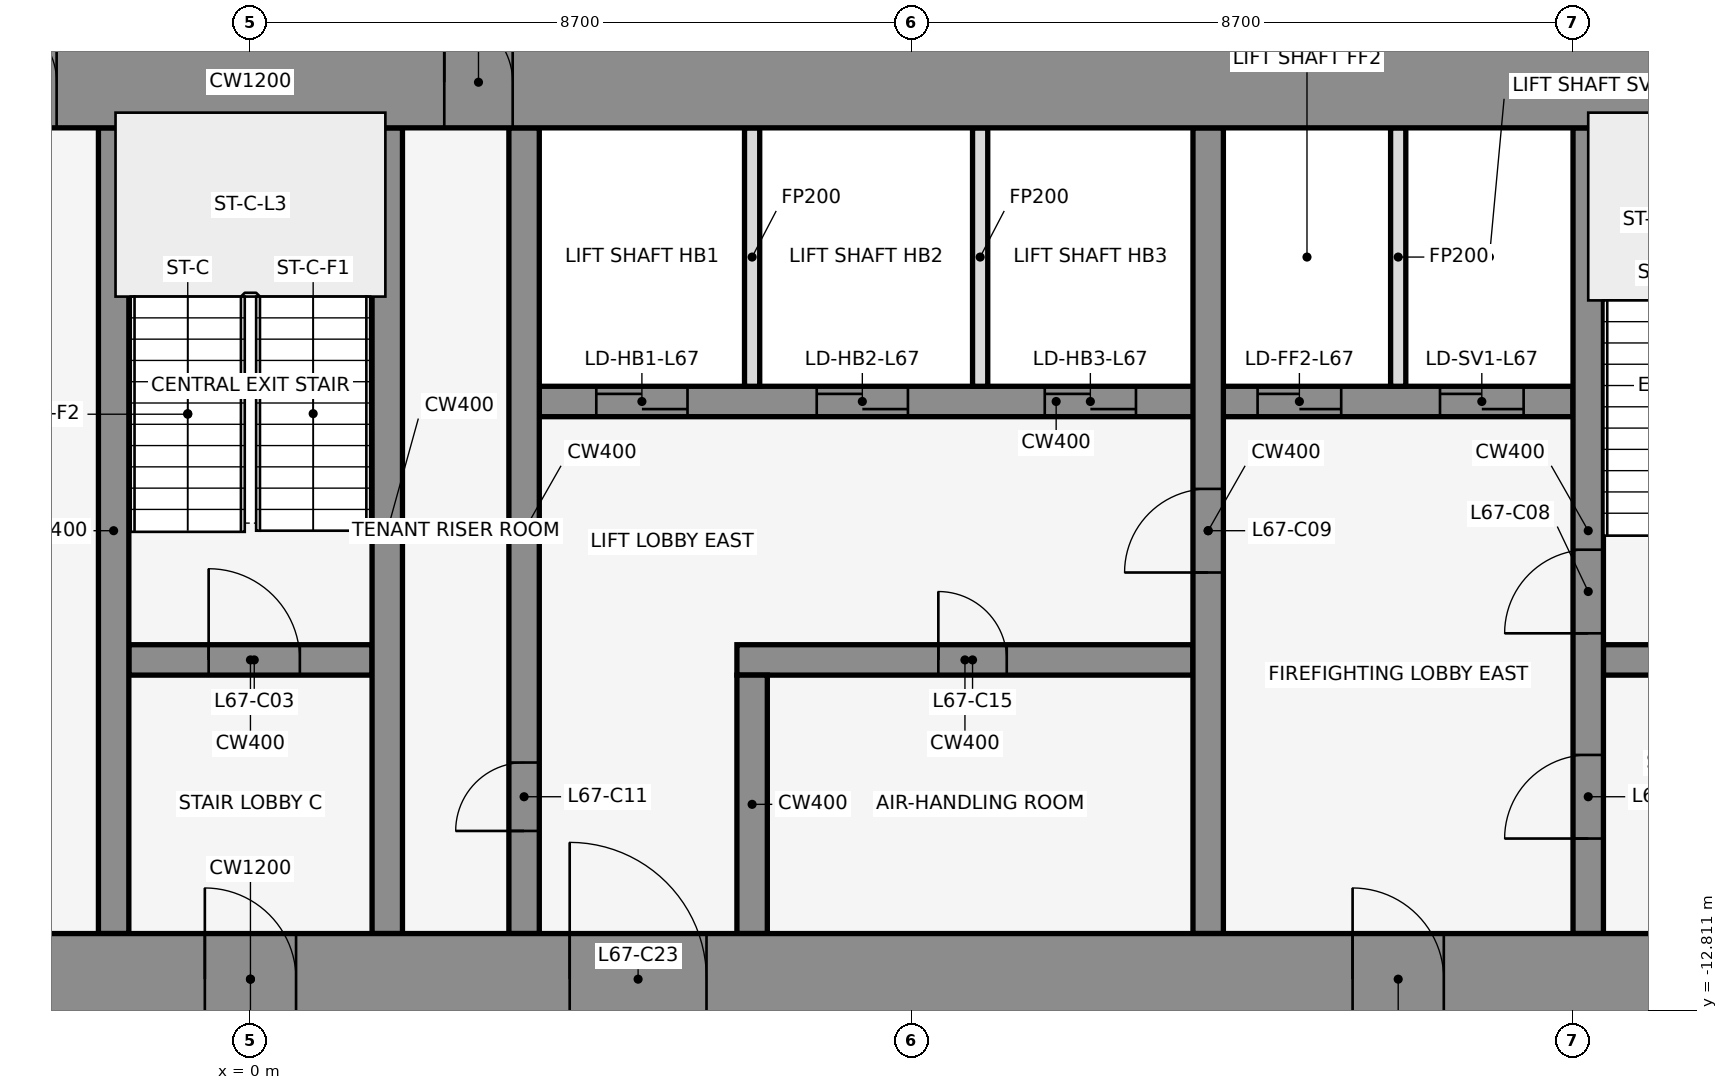
"""IFC4 building model, lengths in metres.
Left out: names, types, materials, properties, quantities, classifications, styles, units other than length and angle.
Written with IfcOpenShell. Run it as: python <this file> out.ifc"""

import sys

from ifc_helpers import new_model, si_unit, direction, frame, frame_2d, origin, place, context, subcontext, project, spatial, rectangle, extrude, element, fill, save


model = new_model("IFC4")
c1 = context("Model", 3, precision=1e-05, world=origin(), true_north=direction((0.0, 1.0)))
c2 = subcontext(c1, "Body", "Model", "MODEL_VIEW")
j1 = project(units=[si_unit("LENGTHUNIT", "METRE"), si_unit("PLANEANGLEUNIT", "RADIAN")], contexts=[c1])
p1 = place(None, origin())
s1 = spatial("IfcSite", under=j1, at=p1, CompositionType="ELEMENT")
p2 = place(p1, origin())
s2 = spatial("IfcBuilding", under=s1, at=p2, CompositionType="ELEMENT")
p3 = place(p2, frame((0.0, 0.0, 297.5)))
s3 = spatial("IfcBuildingStorey", under=s2, at=p3, CompositionType="ELEMENT", Elevation=297.5)
for number, where, z_axis, x_axis in (
    (1, (16.432, -0.105, 0.0), (0.0, 0.0, 1.0), (-0.84, 0.543, 0.0)),
    (2, (1.901, 1.08, 0.0), (0.0, 0.0, 1.0), (-0.84, -0.543, 0.0)),
    (3, (-0.068, -0.105, 0.0), (0.0, 0.0, 1.0), (-0.84, 0.543, 0.0)),
):
    element("IfcWall", number, at=place(p3, frame(where, z_axis=z_axis, x_axis=x_axis)), inside=s3, PredefinedType="STANDARD", context=c2, shape_type="SweptSolid", body=[
        extrude(rectangle(XDim=2.183, YDim=0.25, at=frame_2d((1.091, 0.0))), origin(), (0.0, 0.0, 1.0), 4.35),
    ])
p4 = place(p3, frame((-1.6, -8.2, 0.0), z_axis=(0.0, 0.0, 1.0), x_axis=(1.0, 0.0, 0.0)))
e4 = element("IfcWall", 4, at=p4, inside=s3, PredefinedType="SHEAR", context=c2, shape_type="SweptSolid", body=[
    extrude(rectangle(XDim=3.2, YDim=0.4, at=frame_2d((1.6, 0.0))), origin(), (0.0, 0.0, 1.0), 4.5),
])
p5 = place(p4, frame((1.05, 0.0, 0.0)))
e5 = element("IfcOpeningElement", 5, at=p5, cuts=e4, PredefinedType="OPENING", context=c2, shape_type="SweptSolid", body=[
    extrude(rectangle(XDim=1.2, YDim=2.1, at=frame_2d((0.6, 1.05))), frame((0.0, 0.212, 0.0), z_axis=(0.0, -1.0, 0.0), x_axis=(1.0, 0.0, 0.0)), (0.0, 0.0, 1.0), 0.424),
])
p6 = place(p3, frame((6.4, -8.2, 0.0), z_axis=(0.0, 0.0, 1.0), x_axis=(1.0, 0.0, 0.0)))
e6 = element("IfcWall", 6, at=p6, inside=s3, PredefinedType="SHEAR", context=c2, shape_type="SweptSolid", body=[
    extrude(rectangle(XDim=6.0, YDim=0.4, at=frame_2d((3.0, 0.0))), origin(), (0.0, 0.0, 1.0), 4.5),
])
p7 = place(p6, frame((2.65, 0.0, 0.0)))
e7 = element("IfcOpeningElement", 7, at=p7, cuts=e6, PredefinedType="OPENING", context=c2, shape_type="SweptSolid", body=[
    extrude(rectangle(XDim=0.9, YDim=2.1, at=frame_2d((0.45, 1.05))), frame((0.0, 0.212, 0.0), z_axis=(0.0, -1.0, 0.0), x_axis=(1.0, 0.0, 0.0)), (0.0, 0.0, 1.0), 0.424),
])
p8 = place(p3, frame((17.8, -8.2, 0.0), z_axis=(0.0, 0.0, 1.0), x_axis=(1.0, 0.0, 0.0)))
e8 = element("IfcWall", 8, at=p8, inside=s3, PredefinedType="SHEAR", context=c2, shape_type="SweptSolid", body=[
    extrude(rectangle(XDim=3.0, YDim=0.4, at=frame_2d((1.5, 0.0))), origin(), (0.0, 0.0, 1.0), 4.5),
])
p9 = place(p8, frame((0.85, 0.0, 0.0)))
e9 = element("IfcOpeningElement", 9, at=p9, cuts=e8, PredefinedType="OPENING", context=c2, shape_type="SweptSolid", body=[
    extrude(rectangle(XDim=1.2, YDim=2.1, at=frame_2d((0.6, 1.05))), frame((0.0, 0.212, 0.0), z_axis=(0.0, -1.0, 0.0), x_axis=(1.0, 0.0, 0.0)), (0.0, 0.0, 1.0), 0.424),
])
p10 = place(p3, frame((3.8, -4.8, 0.0), z_axis=(0.0, 0.0, 1.0), x_axis=(1.0, 0.0, 0.0)))
e10 = element("IfcWall", 10, at=p10, inside=s3, PredefinedType="SHEAR", context=c2, shape_type="SweptSolid", body=[
    extrude(rectangle(XDim=13.6, YDim=0.4, at=frame_2d((6.8, 0.0))), origin(), (0.0, 0.0, 1.0), 4.5),
])
p11 = place(p10, frame((0.75, 0.0, 0.0)))
e11 = element("IfcOpeningElement", 11, at=p11, cuts=e10, PredefinedType="OPENING", context=c2, shape_type="SweptSolid", body=[
    extrude(rectangle(XDim=1.2, YDim=2.1, at=frame_2d((0.6, 1.05))), frame((0.0, 0.212, 0.0), z_axis=(0.0, -1.0, 0.0), x_axis=(1.0, 0.0, 0.0)), (0.0, 0.0, 1.0), 0.424),
])
p12 = place(p10, frame((3.65, 0.0, 0.0)))
e12 = element("IfcOpeningElement", 12, at=p12, cuts=e10, PredefinedType="OPENING", context=c2, shape_type="SweptSolid", body=[
    extrude(rectangle(XDim=1.2, YDim=2.1, at=frame_2d((0.6, 1.05))), frame((0.0, 0.212, 0.0), z_axis=(0.0, -1.0, 0.0), x_axis=(1.0, 0.0, 0.0)), (0.0, 0.0, 1.0), 0.424),
])
p13 = place(p10, frame((6.65, 0.0, 0.0)))
e13 = element("IfcOpeningElement", 13, at=p13, cuts=e10, PredefinedType="OPENING", context=c2, shape_type="SweptSolid", body=[
    extrude(rectangle(XDim=1.2, YDim=2.1, at=frame_2d((0.6, 1.05))), frame((0.0, 0.212, 0.0), z_axis=(0.0, -1.0, 0.0), x_axis=(1.0, 0.0, 0.0)), (0.0, 0.0, 1.0), 0.424),
])
p14 = place(p10, frame((9.45, 0.0, 0.0)))
e14 = element("IfcOpeningElement", 14, at=p14, cuts=e10, PredefinedType="OPENING", context=c2, shape_type="SweptSolid", body=[
    extrude(rectangle(XDim=1.1, YDim=2.1, at=frame_2d((0.55, 1.05))), frame((0.0, 0.212, 0.0), z_axis=(0.0, -1.0, 0.0), x_axis=(1.0, 0.0, 0.0)), (0.0, 0.0, 1.0), 0.424),
])
p15 = place(p10, frame((11.85, 0.0, 0.0)))
e15 = element("IfcOpeningElement", 15, at=p15, cuts=e10, PredefinedType="OPENING", context=c2, shape_type="SweptSolid", body=[
    extrude(rectangle(XDim=1.1, YDim=2.1, at=frame_2d((0.55, 1.05))), frame((0.0, 0.212, 0.0), z_axis=(0.0, -1.0, 0.0), x_axis=(1.0, 0.0, 0.0)), (0.0, 0.0, 1.0), 0.424),
])
for number, where, z_axis, x_axis in (
    (16, (-1.8, -11.8, 0.0), (0.0, 0.0, 1.0), (0.0, 1.0, 0.0)),
    (17, (1.8, -11.8, 0.0), (0.0, 0.0, 1.0), (0.0, 1.0, 0.0)),
):
    element("IfcWall", number, at=place(p3, frame(where, z_axis=z_axis, x_axis=x_axis)), inside=s3, PredefinedType="SHEAR", context=c2, shape_type="SweptSolid", body=[
        extrude(rectangle(XDim=10.6, YDim=0.4, at=frame_2d((5.3, 0.0))), origin(), (0.0, 0.0, 1.0), 4.5),
    ])
p16 = place(p3, frame((3.6, -11.8, 0.0), z_axis=(0.0, 0.0, 1.0), x_axis=(0.0, 1.0, 0.0)))
e18 = element("IfcWall", 18, at=p16, inside=s3, PredefinedType="SHEAR", context=c2, shape_type="SweptSolid", body=[
    extrude(rectangle(XDim=10.6, YDim=0.4, at=frame_2d((5.3, 0.0))), origin(), (0.0, 0.0, 1.0), 4.5),
])
p17 = place(p16, frame((1.35, 0.0, 0.0)))
e19 = element("IfcOpeningElement", 19, at=p17, cuts=e18, PredefinedType="OPENING", context=c2, shape_type="SweptSolid", body=[
    extrude(rectangle(XDim=0.9, YDim=2.1, at=frame_2d((0.45, 1.05))), frame((0.0, 0.212, 0.0), z_axis=(0.0, -1.0, 0.0), x_axis=(1.0, 0.0, 0.0)), (0.0, 0.0, 1.0), 0.424),
])
p18 = place(p3, frame((6.6, -11.8, 0.0), z_axis=(0.0, 0.0, 1.0), x_axis=(0.0, 1.0, 0.0)))
e20 = element("IfcWall", 20, at=p18, inside=s3, PredefinedType="SHEAR", context=c2, shape_type="SweptSolid", body=[
    extrude(rectangle(XDim=3.4, YDim=0.4, at=frame_2d((1.7, 0.0))), origin(), (0.0, 0.0, 1.0), 4.5),
])
for number, where, z_axis, x_axis in (
    (21, (6.6, -4.6, 0.0), (0.0, 0.0, 1.0), (0.0, 1.0, 0.0)),
    (22, (9.6, -4.6, 0.0), (0.0, 0.0, 1.0), (0.0, 1.0, 0.0)),
):
    element("IfcWall", number, at=place(p3, frame(where, z_axis=z_axis, x_axis=x_axis)), inside=s3, PredefinedType="PARTITIONING", context=c2, shape_type="SweptSolid", body=[
        extrude(rectangle(XDim=3.4, YDim=0.2, at=frame_2d((1.7, 0.0))), origin(), (0.0, 0.0, 1.0), 3.418),
    ])
p19 = place(p3, frame((12.6, -11.8, 0.0), z_axis=(0.0, 0.0, 1.0), x_axis=(0.0, 1.0, 0.0)))
e23 = element("IfcWall", 23, at=p19, inside=s3, PredefinedType="SHEAR", context=c2, shape_type="SweptSolid", body=[
    extrude(rectangle(XDim=10.6, YDim=0.4, at=frame_2d((5.3, 0.0))), origin(), (0.0, 0.0, 1.0), 4.5),
])
p20 = place(p19, frame((4.75, 0.0, 0.0)))
e24 = element("IfcOpeningElement", 24, at=p20, cuts=e23, PredefinedType="OPENING", context=c2, shape_type="SweptSolid", body=[
    extrude(rectangle(XDim=1.1, YDim=2.1, at=frame_2d((0.55, 1.05))), frame((0.0, 0.212, 0.0), z_axis=(0.0, -1.0, 0.0), x_axis=(1.0, 0.0, 0.0)), (0.0, 0.0, 1.0), 0.424),
])
p21 = place(p3, frame((15.1, -4.6, 0.0), z_axis=(0.0, 0.0, 1.0), x_axis=(0.0, 1.0, 0.0)))
e25 = element("IfcWall", 25, at=p21, inside=s3, PredefinedType="PARTITIONING", context=c2, shape_type="SweptSolid", body=[
    extrude(rectangle(XDim=3.4, YDim=0.2, at=frame_2d((1.7, 0.0))), origin(), (0.0, 0.0, 1.0), 3.418),
])
p22 = place(p3, frame((17.6, -11.8, 0.0), z_axis=(0.0, 0.0, 1.0), x_axis=(0.0, 1.0, 0.0)))
e26 = element("IfcWall", 26, at=p22, inside=s3, PredefinedType="SHEAR", context=c2, shape_type="SweptSolid", body=[
    extrude(rectangle(XDim=10.6, YDim=0.4, at=frame_2d((5.3, 0.0))), origin(), (0.0, 0.0, 1.0), 4.5),
])
p23 = place(p22, frame((1.25, 0.0, 0.0)))
e27 = element("IfcOpeningElement", 27, at=p23, cuts=e26, PredefinedType="OPENING", context=c2, shape_type="SweptSolid", body=[
    extrude(rectangle(XDim=1.1, YDim=2.1, at=frame_2d((0.55, 1.05))), frame((0.0, 0.212, 0.0), z_axis=(0.0, -1.0, 0.0), x_axis=(1.0, 0.0, 0.0)), (0.0, 0.0, 1.0), 0.424),
])
p24 = place(p22, frame((3.95, 0.0, 0.0)))
e28 = element("IfcOpeningElement", 28, at=p24, cuts=e26, PredefinedType="OPENING", context=c2, shape_type="SweptSolid", body=[
    extrude(rectangle(XDim=1.1, YDim=2.1, at=frame_2d((0.55, 1.05))), frame((0.0, 0.212, 0.0), z_axis=(0.0, -1.0, 0.0), x_axis=(1.0, 0.0, 0.0)), (0.0, 0.0, 1.0), 0.424),
])
p25 = place(p3, frame((-22.0, -0.6, 0.0), z_axis=(0.0, 0.0, 1.0), x_axis=(1.0, 0.0, 0.0)))
e29 = element("IfcWall", 29, at=p25, inside=s3, PredefinedType="SHEAR", context=c2, shape_type="SweptSolid", body=[
    extrude(rectangle(XDim=44.0, YDim=1.2, at=frame_2d((22.0, 0.0))), origin(), (0.0, 0.0, 1.0), 4.5),
])
p26 = place(p25, frame((18.55, 0.0, 0.0)))
e30 = element("IfcOpeningElement", 30, at=p26, cuts=e29, PredefinedType="OPENING", context=c2, shape_type="SweptSolid", body=[
    extrude(rectangle(XDim=0.9, YDim=2.1, at=frame_2d((0.45, 1.05))), frame((0.0, 0.612, 0.0), z_axis=(0.0, -1.0, 0.0), x_axis=(1.0, 0.0, 0.0)), (0.0, 0.0, 1.0), 1.224),
])
p27 = place(p25, frame((24.55, 0.0, 0.0)))
e31 = element("IfcOpeningElement", 31, at=p27, cuts=e29, PredefinedType="OPENING", context=c2, shape_type="SweptSolid", body=[
    extrude(rectangle(XDim=0.9, YDim=2.1, at=frame_2d((0.45, 1.05))), frame((0.0, 0.612, 0.0), z_axis=(0.0, -1.0, 0.0), x_axis=(1.0, 0.0, 0.0)), (0.0, 0.0, 1.0), 1.224),
])
p28 = place(p3, frame((-22.0, -12.4, 0.0), z_axis=(0.0, 0.0, 1.0), x_axis=(1.0, 0.0, 0.0)))
e32 = element("IfcWall", 32, at=p28, inside=s3, PredefinedType="SHEAR", context=c2, shape_type="SweptSolid", body=[
    extrude(rectangle(XDim=44.0, YDim=1.2, at=frame_2d((22.0, 0.0))), origin(), (0.0, 0.0, 1.0), 4.5),
])
p29 = place(p28, frame((2.2, 0.0, 0.0)))
e33 = element("IfcOpeningElement", 33, at=p29, cuts=e32, PredefinedType="OPENING", context=c2, shape_type="SweptSolid", body=[
    extrude(rectangle(XDim=1.2, YDim=2.1, at=frame_2d((0.6, 1.05))), frame((0.0, 0.612, 0.0), z_axis=(0.0, -1.0, 0.0), x_axis=(1.0, 0.0, 0.0)), (0.0, 0.0, 1.0), 1.224),
])
p30 = place(p28, frame((21.4, 0.0, 0.0)))
e34 = element("IfcOpeningElement", 34, at=p30, cuts=e32, PredefinedType="OPENING", context=c2, shape_type="SweptSolid", body=[
    extrude(rectangle(XDim=1.2, YDim=2.1, at=frame_2d((0.6, 1.05))), frame((0.0, 0.612, 0.0), z_axis=(0.0, -1.0, 0.0), x_axis=(1.0, 0.0, 0.0)), (0.0, 0.0, 1.0), 1.224),
])
p31 = place(p28, frame((40.6, 0.0, 0.0)))
e35 = element("IfcOpeningElement", 35, at=p31, cuts=e32, PredefinedType="OPENING", context=c2, shape_type="SweptSolid", body=[
    extrude(rectangle(XDim=1.2, YDim=2.1, at=frame_2d((0.6, 1.05))), frame((0.0, 0.612, 0.0), z_axis=(0.0, -1.0, 0.0), x_axis=(1.0, 0.0, 0.0)), (0.0, 0.0, 1.0), 1.224),
])
p32 = place(p28, frame((16.0, 0.0, 0.0)))
e36 = element("IfcOpeningElement", 36, at=p32, cuts=e32, PredefinedType="OPENING", context=c2, shape_type="SweptSolid", body=[
    extrude(rectangle(XDim=1.8, YDim=2.1, at=frame_2d((0.9, 1.05))), frame((0.0, 0.612, 0.0), z_axis=(0.0, -1.0, 0.0), x_axis=(1.0, 0.0, 0.0)), (0.0, 0.0, 1.0), 1.224),
])
p33 = place(p28, frame((6.3, 0.0, 0.0)))
e37 = element("IfcOpeningElement", 37, at=p33, cuts=e32, PredefinedType="OPENING", context=c2, shape_type="SweptSolid", body=[
    extrude(rectangle(XDim=1.2, YDim=2.1, at=frame_2d((0.6, 1.05))), frame((0.0, 0.612, 0.0), z_axis=(0.0, -1.0, 0.0), x_axis=(1.0, 0.0, 0.0)), (0.0, 0.0, 1.0), 1.224),
])
p34 = place(p28, frame((26.2, 0.0, 0.0)))
e38 = element("IfcOpeningElement", 38, at=p34, cuts=e32, PredefinedType="OPENING", context=c2, shape_type="SweptSolid", body=[
    extrude(rectangle(XDim=1.8, YDim=2.1, at=frame_2d((0.9, 1.05))), frame((0.0, 0.612, 0.0), z_axis=(0.0, -1.0, 0.0), x_axis=(1.0, 0.0, 0.0)), (0.0, 0.0, 1.0), 1.224),
])
p35 = place(p28, frame((36.5, 0.0, 0.0)))
e39 = element("IfcOpeningElement", 39, at=p35, cuts=e32, PredefinedType="OPENING", context=c2, shape_type="SweptSolid", body=[
    extrude(rectangle(XDim=1.2, YDim=2.1, at=frame_2d((0.6, 1.05))), frame((0.0, 0.612, 0.0), z_axis=(0.0, -1.0, 0.0), x_axis=(1.0, 0.0, 0.0)), (0.0, 0.0, 1.0), 1.224),
])
p36 = place(p5, origin())
e40 = element("IfcDoor", 40, at=p36, inside=s3, OperationType="SINGLE_SWING_LEFT", PredefinedType="DOOR", context=c2, shape_type="SweptSolid", body=[
    extrude(rectangle(XDim=1.2, YDim=2.1, at=frame_2d((0.6, 1.05))), frame((0.0, 0.025, 0.0), z_axis=(0.0, -1.0, 0.0), x_axis=(1.0, 0.0, 0.0)), (0.0, 0.0, 1.0), 0.05),
])
fill(e5, e40)
p37 = place(p23, origin())
e41 = element("IfcDoor", 41, at=p37, inside=s3, OperationType="SINGLE_SWING_LEFT", PredefinedType="DOOR", context=c2, shape_type="SweptSolid", body=[
    extrude(rectangle(XDim=1.1, YDim=2.1, at=frame_2d((0.55, 1.05))), frame((0.0, 0.025, 0.0), z_axis=(0.0, -1.0, 0.0), x_axis=(1.0, 0.0, 0.0)), (0.0, 0.0, 1.0), 0.05),
])
fill(e27, e41)
p38 = place(p11, origin())
e42 = element("IfcDoor", 42, at=p38, inside=s3, OperationType="DOUBLE_DOOR_SLIDING", PredefinedType="DOOR", context=c2, shape_type="SweptSolid", body=[
    extrude(rectangle(XDim=1.2, YDim=2.1, at=frame_2d((0.6, 1.05))), frame((0.0, 0.025, 0.0), z_axis=(0.0, -1.0, 0.0), x_axis=(1.0, 0.0, 0.0)), (0.0, 0.0, 1.0), 0.05),
])
fill(e11, e42)
p39 = place(p12, origin())
e43 = element("IfcDoor", 43, at=p39, inside=s3, OperationType="DOUBLE_DOOR_SLIDING", PredefinedType="DOOR", context=c2, shape_type="SweptSolid", body=[
    extrude(rectangle(XDim=1.2, YDim=2.1, at=frame_2d((0.6, 1.05))), frame((0.0, 0.025, 0.0), z_axis=(0.0, -1.0, 0.0), x_axis=(1.0, 0.0, 0.0)), (0.0, 0.0, 1.0), 0.05),
])
fill(e12, e43)
p40 = place(p13, origin())
e44 = element("IfcDoor", 44, at=p40, inside=s3, OperationType="DOUBLE_DOOR_SLIDING", PredefinedType="DOOR", context=c2, shape_type="SweptSolid", body=[
    extrude(rectangle(XDim=1.2, YDim=2.1, at=frame_2d((0.6, 1.05))), frame((0.0, 0.025, 0.0), z_axis=(0.0, -1.0, 0.0), x_axis=(1.0, 0.0, 0.0)), (0.0, 0.0, 1.0), 0.05),
])
fill(e13, e44)
p41 = place(p14, origin())
e45 = element("IfcDoor", 45, at=p41, inside=s3, OperationType="DOUBLE_DOOR_SLIDING", PredefinedType="DOOR", context=c2, shape_type="SweptSolid", body=[
    extrude(rectangle(XDim=1.1, YDim=2.1, at=frame_2d((0.55, 1.05))), frame((0.0, 0.025, 0.0), z_axis=(0.0, -1.0, 0.0), x_axis=(1.0, 0.0, 0.0)), (0.0, 0.0, 1.0), 0.05),
])
fill(e14, e45)
p42 = place(p15, origin())
e46 = element("IfcDoor", 46, at=p42, inside=s3, OperationType="DOUBLE_DOOR_SLIDING", PredefinedType="DOOR", context=c2, shape_type="SweptSolid", body=[
    extrude(rectangle(XDim=1.1, YDim=2.1, at=frame_2d((0.55, 1.05))), frame((0.0, 0.025, 0.0), z_axis=(0.0, -1.0, 0.0), x_axis=(1.0, 0.0, 0.0)), (0.0, 0.0, 1.0), 0.05),
])
fill(e15, e46)
p43 = place(p24, origin())
e47 = element("IfcDoor", 47, at=p43, inside=s3, OperationType="SINGLE_SWING_RIGHT", PredefinedType="DOOR", context=c2, shape_type="SweptSolid", body=[
    extrude(rectangle(XDim=1.1, YDim=2.1, at=frame_2d((0.55, 1.05))), frame((0.0, 0.025, 0.0), z_axis=(0.0, -1.0, 0.0), x_axis=(1.0, 0.0, 0.0)), (0.0, 0.0, 1.0), 0.05),
])
fill(e28, e47)
p44 = place(p20, frame((1.1, 0.0, 0.0), z_axis=(0.0, 0.0, 1.0), x_axis=(-1.0, 0.0, 0.0)))
e48 = element("IfcDoor", 48, at=p44, inside=s3, OperationType="SINGLE_SWING_RIGHT", PredefinedType="DOOR", context=c2, shape_type="SweptSolid", body=[
    extrude(rectangle(XDim=1.1, YDim=2.1, at=frame_2d((0.55, 1.05))), frame((0.0, 0.025, 0.0), z_axis=(0.0, -1.0, 0.0), x_axis=(1.0, 0.0, 0.0)), (0.0, 0.0, 1.0), 0.05),
])
fill(e24, e48)
p45 = place(p17, origin())
e49 = element("IfcDoor", 49, at=p45, inside=s3, OperationType="SINGLE_SWING_LEFT", PredefinedType="DOOR", context=c2, shape_type="SweptSolid", body=[
    extrude(rectangle(XDim=0.9, YDim=2.1, at=frame_2d((0.45, 1.05))), frame((0.0, 0.025, 0.0), z_axis=(0.0, -1.0, 0.0), x_axis=(1.0, 0.0, 0.0)), (0.0, 0.0, 1.0), 0.05),
])
fill(e19, e49)
p46 = place(p7, frame((0.9, 0.0, 0.0), z_axis=(0.0, 0.0, 1.0), x_axis=(-1.0, 0.0, 0.0)))
e50 = element("IfcDoor", 50, at=p46, inside=s3, OperationType="SINGLE_SWING_RIGHT", PredefinedType="DOOR", context=c2, shape_type="SweptSolid", body=[
    extrude(rectangle(XDim=0.9, YDim=2.1, at=frame_2d((0.45, 1.05))), frame((0.0, 0.025, 0.0), z_axis=(0.0, -1.0, 0.0), x_axis=(1.0, 0.0, 0.0)), (0.0, 0.0, 1.0), 0.05),
])
fill(e7, e50)
p47 = place(p26, origin())
e51 = element("IfcDoor", 51, at=p47, inside=s3, OperationType="SINGLE_SWING_LEFT", PredefinedType="DOOR", context=c2, shape_type="SweptSolid", body=[
    extrude(rectangle(XDim=0.9, YDim=2.1, at=frame_2d((0.45, 1.05))), frame((0.0, 0.025, 0.0), z_axis=(0.0, -1.0, 0.0), x_axis=(1.0, 0.0, 0.0)), (0.0, 0.0, 1.0), 0.05),
])
fill(e30, e51)
p48 = place(p27, origin())
e52 = element("IfcDoor", 52, at=p48, inside=s3, OperationType="SINGLE_SWING_LEFT", PredefinedType="DOOR", context=c2, shape_type="SweptSolid", body=[
    extrude(rectangle(XDim=0.9, YDim=2.1, at=frame_2d((0.45, 1.05))), frame((0.0, 0.025, 0.0), z_axis=(0.0, -1.0, 0.0), x_axis=(1.0, 0.0, 0.0)), (0.0, 0.0, 1.0), 0.05),
])
fill(e31, e52)
p49 = place(p30, frame((1.2, 0.0, 0.0), z_axis=(0.0, 0.0, 1.0), x_axis=(-1.0, 0.0, 0.0)))
e53 = element("IfcDoor", 53, at=p49, inside=s3, OperationType="SINGLE_SWING_RIGHT", PredefinedType="DOOR", context=c2, shape_type="SweptSolid", body=[
    extrude(rectangle(XDim=1.2, YDim=2.1, at=frame_2d((0.6, 1.05))), frame((0.0, 0.025, 0.0), z_axis=(0.0, -1.0, 0.0), x_axis=(1.0, 0.0, 0.0)), (0.0, 0.0, 1.0), 0.05),
])
fill(e34, e53)
p50 = place(p34, origin())
e54 = element("IfcDoor", 54, at=p50, inside=s3, OperationType="SINGLE_SWING_LEFT", PredefinedType="DOOR", context=c2, shape_type="SweptSolid", body=[
    extrude(rectangle(XDim=1.8, YDim=2.1, at=frame_2d((0.9, 1.05))), frame((0.0, 0.025, 0.0), z_axis=(0.0, -1.0, 0.0), x_axis=(1.0, 0.0, 0.0)), (0.0, 0.0, 1.0), 0.05),
])
fill(e38, e54)
p51 = place(p35, frame((1.2, 0.0, 0.0), z_axis=(0.0, 0.0, 1.0), x_axis=(-1.0, 0.0, 0.0)))
e55 = element("IfcDoor", 55, at=p51, inside=s3, OperationType="SINGLE_SWING_RIGHT", PredefinedType="DOOR", context=c2, shape_type="SweptSolid", body=[
    extrude(rectangle(XDim=1.2, YDim=2.1, at=frame_2d((0.6, 1.05))), frame((0.0, 0.025, 0.0), z_axis=(0.0, -1.0, 0.0), x_axis=(1.0, 0.0, 0.0)), (0.0, 0.0, 1.0), 0.05),
])
fill(e39, e55)
save(model, sys.argv[1])
